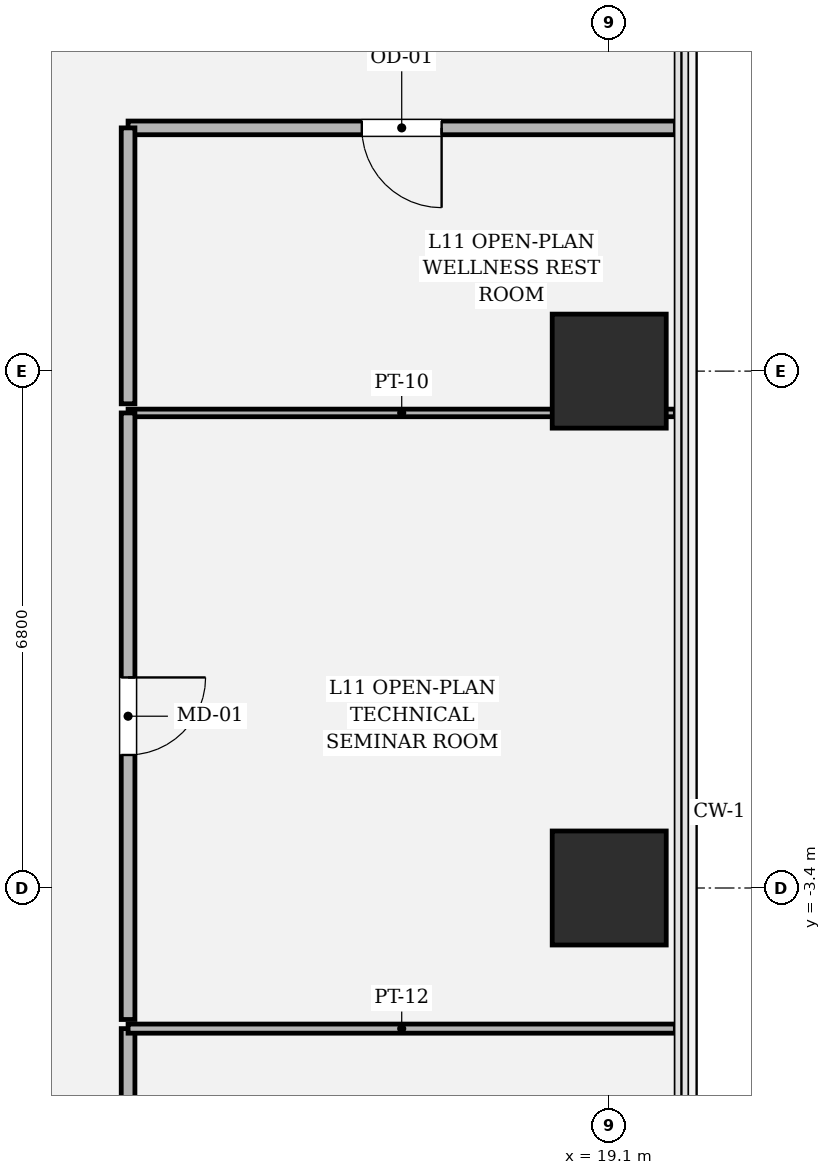
"""IFC4 building model, lengths in metres.
Left out: names, types, materials, properties, quantities, classifications, styles, units other than length and angle.
Written with IfcOpenShell. Run it as: python <this file> out.ifc"""

import sys

from ifc_helpers import new_model, si_unit, direction, frame, frame_2d, origin, origin_2d, place, context, subcontext, project, spatial, rectangle, hollow_rectangle, extrude, element, fill, save


model = new_model("IFC4")
c1 = context("Model", 3, precision=1e-05, world=origin(), true_north=direction((0.0, 1.0)))
c2 = subcontext(c1, "Body", "Model", "MODEL_VIEW")
j1 = project(units=[si_unit("LENGTHUNIT", "METRE"), si_unit("PLANEANGLEUNIT", "RADIAN")], contexts=[c1])
p1 = place(None, origin())
s1 = spatial("IfcSite", under=j1, at=p1, CompositionType="ELEMENT")
p2 = place(p1, origin())
s2 = spatial("IfcBuilding", under=s1, at=p2, CompositionType="ELEMENT")
p3 = place(p2, frame((0.0, 0.0, 52.5)))
s3 = spatial("IfcBuildingStorey", under=s2, at=p3, CompositionType="ELEMENT", Elevation=52.5)
for number, where, z_axis, x_axis in (
    (1, (19.1, -3.4, 0.0), (0.0, 0.0, 1.0), (1.0, 0.0, 0.0)),
    (2, (19.1, 3.4, 0.0), (0.0, 0.0, 1.0), (1.0, 0.0, 0.0)),
):
    element("IfcColumn", number, at=place(p3, frame(where, z_axis=z_axis, x_axis=x_axis)), inside=s3, PredefinedType="COLUMN", context=c2, shape_type="SweptSolid", body=[
        extrude(hollow_rectangle(XDim=1.5, YDim=1.5, WallThickness=0.045, at=origin_2d()), origin(), (0.0, 0.0, 1.0), 4.05),
    ])
p4 = place(p3, frame((12.77, -11.77, 0.0), z_axis=(0.0, 0.0, 1.0), x_axis=(0.0, 1.0, 0.0)))
e3 = element("IfcWall", 3, at=p4, inside=s3, PredefinedType="PARTITIONING", context=c2, shape_type="SweptSolid", body=[
    extrude(rectangle(XDim=6.52, YDim=0.18, at=frame_2d((3.26, 0.0))), origin(), (0.0, 0.0, 1.0), 3.104),
])
p5 = place(p4, frame((2.735, 0.0, 0.0)))
e4 = element("IfcOpeningElement", 4, at=p5, cuts=e3, PredefinedType="OPENING", context=c2, shape_type="SweptSolid", body=[
    extrude(rectangle(XDim=1.05, YDim=2.2, at=frame_2d((0.525, 1.1))), frame((0.0, 0.1, 0.0), z_axis=(0.0, -1.0, 0.0), x_axis=(1.0, 0.0, 0.0)), (0.0, 0.0, 1.0), 0.2),
])
p6 = place(p3, frame((12.77, -5.25, 0.0), z_axis=(0.0, 0.0, 1.0), x_axis=(1.0, 0.0, 0.0)))
e5 = element("IfcWall", 5, at=p6, inside=s3, PredefinedType="PARTITIONING", context=c2, shape_type="SweptSolid", body=[
    extrude(rectangle(XDim=7.2, YDim=0.12, at=frame_2d((3.6, 0.0))), origin(), (0.0, 0.0, 1.0), 3.104),
])
p7 = place(p3, frame((12.77, 2.85, 0.0), z_axis=(0.0, 0.0, 1.0), x_axis=(1.0, 0.0, 0.0)))
e6 = element("IfcWall", 6, at=p7, inside=s3, PredefinedType="PARTITIONING", context=c2, shape_type="SweptSolid", body=[
    extrude(rectangle(XDim=7.2, YDim=0.1, at=frame_2d((3.6, 0.0))), origin(), (0.0, 0.0, 1.0), 3.104),
])
p8 = place(p3, frame((12.77, -5.13, 0.0), z_axis=(0.0, 0.0, 1.0), x_axis=(0.0, 1.0, 0.0)))
e7 = element("IfcWall", 7, at=p8, inside=s3, PredefinedType="PARTITIONING", context=c2, shape_type="SweptSolid", body=[
    extrude(rectangle(XDim=7.98, YDim=0.18, at=frame_2d((3.99, 0.0))), origin(), (0.0, 0.0, 1.0), 3.104),
])
p9 = place(p8, frame((3.48, 0.0, 0.0)))
e8 = element("IfcOpeningElement", 8, at=p9, cuts=e7, PredefinedType="OPENING", context=c2, shape_type="SweptSolid", body=[
    extrude(rectangle(XDim=1.02, YDim=2.2, at=frame_2d((0.51, 1.1))), frame((0.0, 0.1, 0.0), z_axis=(0.0, -1.0, 0.0), x_axis=(1.0, 0.0, 0.0)), (0.0, 0.0, 1.0), 0.2),
])
p10 = place(p3, frame((12.77, 6.6, 0.0), z_axis=(0.0, 0.0, 1.0), x_axis=(1.0, 0.0, 0.0)))
e9 = element("IfcWall", 9, at=p10, inside=s3, PredefinedType="PARTITIONING", context=c2, shape_type="SweptSolid", body=[
    extrude(rectangle(XDim=7.2, YDim=0.18, at=frame_2d((3.6, 0.0))), origin(), (0.0, 0.0, 1.0), 3.104),
])
p11 = place(p10, frame((3.075, 0.0, 0.0)))
e10 = element("IfcOpeningElement", 10, at=p11, cuts=e9, PredefinedType="OPENING", context=c2, shape_type="SweptSolid", body=[
    extrude(rectangle(XDim=1.05, YDim=2.2, at=frame_2d((0.525, 1.1))), frame((0.0, 0.1, 0.0), z_axis=(0.0, -1.0, 0.0), x_axis=(1.0, 0.0, 0.0)), (0.0, 0.0, 1.0), 0.2),
])
p12 = place(p3, frame((12.77, 2.97, 0.0), z_axis=(0.0, 0.0, 1.0), x_axis=(0.0, 1.0, 0.0)))
e11 = element("IfcWall", 11, at=p12, inside=s3, PredefinedType="PARTITIONING", context=c2, shape_type="SweptSolid", body=[
    extrude(rectangle(XDim=3.63, YDim=0.18, at=frame_2d((1.815, 0.0))), origin(), (0.0, 0.0, 1.0), 3.104),
])
p13 = place(p9, origin())
e12 = element("IfcDoor", 12, at=p13, inside=s3, OperationType="SINGLE_SWING_RIGHT", PredefinedType="DOOR", context=c2, shape_type="SweptSolid", body=[
    extrude(rectangle(XDim=1.02, YDim=2.2, at=frame_2d((0.51, 1.1))), frame((0.0, 0.025, 0.0), z_axis=(0.0, -1.0, 0.0), x_axis=(1.0, 0.0, 0.0)), (0.0, 0.0, 1.0), 0.05),
])
fill(e8, e12)
p14 = place(p11, origin())
e13 = element("IfcDoor", 13, at=p14, inside=s3, OperationType="SINGLE_SWING_RIGHT", PredefinedType="DOOR", context=c2, shape_type="SweptSolid", body=[
    extrude(rectangle(XDim=1.05, YDim=2.2, at=frame_2d((0.525, 1.1))), frame((0.0, 0.025, 0.0), z_axis=(0.0, -1.0, 0.0), x_axis=(1.0, 0.0, 0.0)), (0.0, 0.0, 1.0), 0.05),
])
fill(e10, e13)
save(model, sys.argv[1])
